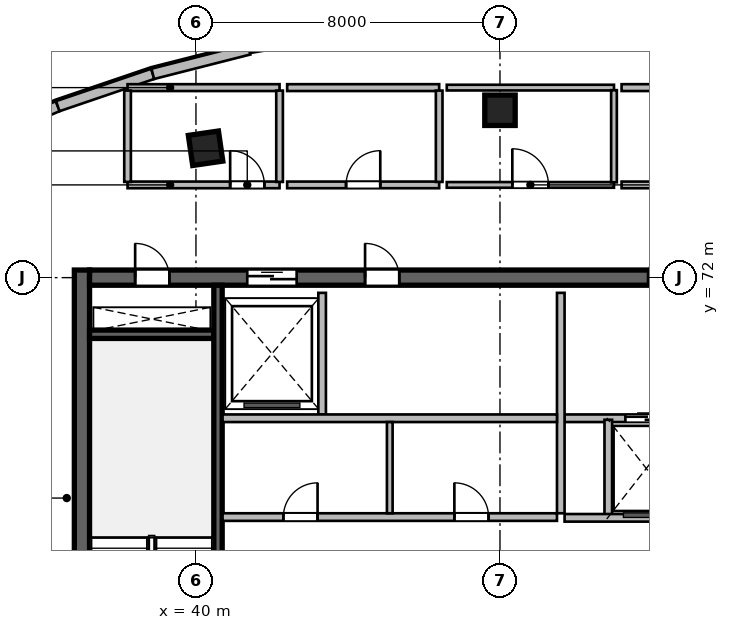
"""IFC4 building model, lengths in metres.
Left out: names, types, materials, properties, quantities, classifications, styles, units other than length and angle.
Written with IfcOpenShell. Run it as: python <this file> out.ifc"""

import sys

from ifc_helpers import new_model, si_unit, direction, frame, frame_2d, origin, origin_2d, place, context, subcontext, project, spatial, rectangle, extrude, source, transform, mapped, element, fill, save


model = new_model("IFC4")
c1 = context("Model", 3, precision=1e-05, world=origin(), true_north=direction((0.0, 1.0)))
c2 = subcontext(c1, "Body", "Model", "MODEL_VIEW")
j1 = project(units=[si_unit("LENGTHUNIT", "METRE"), si_unit("PLANEANGLEUNIT", "RADIAN")], contexts=[c1])
p1 = place(None, origin())
s1 = spatial("IfcSite", under=j1, at=p1, CompositionType="ELEMENT")
p2 = place(p1, origin())
s2 = spatial("IfcBuilding", under=s1, at=p2, CompositionType="ELEMENT")
p3 = place(p2, frame((0.0, 0.0, 283.5)))
s3 = spatial("IfcBuildingStorey", under=s2, at=p3, CompositionType="ELEMENT", Elevation=283.5)
m1 = source(origin(), c2, "Body", "SweptSolid", [
    extrude(rectangle(XDim=12.0, YDim=0.4, at=frame_2d((6.0, 0.0))), origin(), (0.0, 0.0, 1.0), 3.9),
])
p4 = place(p3, frame((37.0, 60.2, 0.0), z_axis=(0.0, 0.0, 1.0), x_axis=(0.0, 1.0, 0.0)))
e1 = element("IfcWall", 1, at=p4, inside=s3, PredefinedType="SHEAR", context=c2, shape_type="MappedRepresentation", body=[
    mapped(m1, transform((0.0, 0.0, 0.0), scale=1.0)),
])
m2 = source(origin(), c2, "Body", "SweptSolid", [
    extrude(rectangle(XDim=21.6, YDim=0.4, at=frame_2d((10.8, 0.0))), origin(), (0.0, 0.0, 1.0), 3.9),
])
p5 = place(p3, frame((37.2, 72.0, 0.0), z_axis=(0.0, 0.0, 1.0), x_axis=(1.0, 0.0, 0.0)))
e2 = element("IfcWall", 2, at=p5, inside=s3, PredefinedType="SHEAR", context=c2, shape_type="MappedRepresentation", body=[
    mapped(m2, transform((0.0, 0.0, 0.0), scale=1.0)),
])
p6 = place(p5, frame((1.2, 0.0, 0.0)))
e3 = element("IfcOpeningElement", 3, at=p6, cuts=e2, PredefinedType="OPENING", context=c2, shape_type="SweptSolid", body=[
    extrude(rectangle(XDim=0.9, YDim=2.1, at=frame_2d((0.45, 1.05))), frame((0.0, 0.21, 0.0), z_axis=(0.0, -1.0, 0.0), x_axis=(1.0, 0.0, 0.0)), (0.0, 0.0, 1.0), 0.42),
])
p7 = place(p5, frame((14.7, 0.0, 0.0)))
e4 = element("IfcOpeningElement", 4, at=p7, cuts=e2, PredefinedType="OPENING", context=c2, shape_type="SweptSolid", body=[
    extrude(rectangle(XDim=1.2, YDim=2.15, at=frame_2d((0.6, 1.075))), frame((0.0, 0.21, 0.0), z_axis=(0.0, -1.0, 0.0), x_axis=(1.0, 0.0, 0.0)), (0.0, 0.0, 1.0), 0.42),
])
p8 = place(p5, frame((4.15, 0.0, 0.0)))
e5 = element("IfcOpeningElement", 5, at=p8, cuts=e2, PredefinedType="OPENING", context=c2, shape_type="SweptSolid", body=[
    extrude(rectangle(XDim=1.3, YDim=2.15, at=frame_2d((0.65, 1.075))), frame((0.0, 0.21, 0.0), z_axis=(0.0, -1.0, 0.0), x_axis=(1.0, 0.0, 0.0)), (0.0, 0.0, 1.0), 0.42),
])
p9 = place(p5, frame((7.25, 0.0, 0.0)))
e6 = element("IfcOpeningElement", 6, at=p9, cuts=e2, PredefinedType="OPENING", context=c2, shape_type="SweptSolid", body=[
    extrude(rectangle(XDim=0.9, YDim=2.1, at=frame_2d((0.45, 1.05))), frame((0.0, 0.21, 0.0), z_axis=(0.0, -1.0, 0.0), x_axis=(1.0, 0.0, 0.0)), (0.0, 0.0, 1.0), 0.42),
])
m3 = source(origin(), c2, "Body", "SweptSolid", [
    extrude(rectangle(XDim=3.27, YDim=0.22, at=frame_2d((1.635, 0.0))), origin(), (0.0, 0.0, 1.0), 3.9),
])
p10 = place(p3, frame((37.2, 70.51, 0.0), z_axis=(0.0, 0.0, 1.0), x_axis=(1.0, 0.0, 0.0)))
e7 = element("IfcWall", 7, at=p10, inside=s3, PredefinedType="SHEAR", context=c2, shape_type="MappedRepresentation", body=[
    mapped(m3, transform((0.0, 0.0, 0.0), scale=1.0)),
])
m4 = source(origin(), c2, "Body", "SweptSolid", [
    extrude(rectangle(XDim=11.2, YDim=0.22, at=frame_2d((5.6, 0.0))), origin(), (0.0, 0.0, 1.0), 3.9),
])
p11 = place(p3, frame((40.58, 60.6, 0.0), z_axis=(0.0, 0.0, 1.0), x_axis=(0.0, 1.0, 0.0)))
e8 = element("IfcWall", 8, at=p11, inside=s3, PredefinedType="SHEAR", context=c2, shape_type="MappedRepresentation", body=[
    mapped(m4, transform((0.0, 0.0, 0.0), scale=1.0)),
])
m5 = source(origin(), c2, "Body", "SweptSolid", [
    extrude(rectangle(XDim=0.8, YDim=0.8, at=origin_2d()), origin(), (0.0, 0.0, 1.0), 3.9),
])
for number, where, z_axis, x_axis in (
    (9, (40.253, 75.404, 0.0), (0.0, 0.0, 1.0), (-0.143, 0.99, 0.0)),
    (10, (48.0, 76.404, 0.0), (0.0, 0.0, 1.0), (0.0, 1.0, 0.0)),
):
    element("IfcColumn", number, at=place(p3, frame(where, z_axis=z_axis, x_axis=x_axis)), inside=s3, PredefinedType="COLUMN", context=c2, shape_type="MappedRepresentation", body=[
        mapped(m5, transform((0.0, 0.0, 0.0), scale=1.0)),
    ])
m6 = source(origin(), c2, "Body", "SweptSolid", [
    extrude(rectangle(XDim=2.673, YDim=0.28, at=frame_2d((1.337, 0.0))), origin(), (0.0, 0.0, 1.0), 3.64),
])
p12 = place(p3, frame((33.907, 75.458, 0.0), z_axis=(0.0, 0.0, 1.0), x_axis=(0.919036345912, 0.394172798266, 0.0)))
e11 = element("IfcWall", 11, at=p12, inside=s3, PredefinedType="SOLIDWALL", context=c2, shape_type="MappedRepresentation", body=[
    mapped(m6, transform((0.0, 0.0, 0.0), scale=1.0)),
])
m7 = source(origin(), c2, "Body", "SweptSolid", [
    extrude(rectangle(XDim=2.64, YDim=0.28, at=frame_2d((1.32, 0.0))), origin(), (0.0, 0.0, 1.0), 3.64),
])
p13 = place(p3, frame((36.364, 76.511, 0.0), z_axis=(0.0, 0.0, 1.0), x_axis=(0.946685911962, 0.322158011064, 0.0)))
e12 = element("IfcWall", 12, at=p13, inside=s3, PredefinedType="SOLIDWALL", context=c2, shape_type="MappedRepresentation", body=[
    mapped(m7, transform((0.0, 0.0, 0.0), scale=1.0)),
])
m8 = source(origin(), c2, "Body", "SweptSolid", [
    extrude(rectangle(XDim=2.614, YDim=0.28, at=frame_2d((1.307, 0.0))), origin(), (0.0, 0.0, 1.0), 3.64),
])
p14 = place(p3, frame((38.863, 77.362, 0.0), z_axis=(0.0, 0.0, 1.0), x_axis=(0.969106509315, 0.246642602978, 0.0)))
e13 = element("IfcWall", 13, at=p14, inside=s3, PredefinedType="SOLIDWALL", context=c2, shape_type="MappedRepresentation", body=[
    mapped(m8, transform((0.0, 0.0, 0.0), scale=1.0)),
])
m9 = source(origin(), c2, "Body", "SweptSolid", [
    extrude(rectangle(XDim=5.62, YDim=0.2, at=frame_2d((2.81, 0.0))), origin(), (0.0, 0.0, 1.0), 3.64),
])
p15 = place(p3, frame((49.7, 68.3, 0.0), z_axis=(0.0, 0.0, 1.0), x_axis=(1.0, 0.0, 0.0)))
e14 = element("IfcWall", 14, at=p15, inside=s3, PredefinedType="SOLIDWALL", context=c2, shape_type="MappedRepresentation", body=[
    mapped(m9, transform((0.0, 0.0, 0.0), scale=1.0)),
])
p16 = place(p15, frame((1.6, 0.0, 0.0)))
e15 = element("IfcOpeningElement", 15, at=p16, cuts=e14, PredefinedType="OPENING", context=c2, shape_type="SweptSolid", body=[
    extrude(rectangle(XDim=1.1, YDim=2.15, at=frame_2d((0.55, 1.075))), frame((0.0, 0.11, 0.0), z_axis=(0.0, -1.0, 0.0), x_axis=(1.0, 0.0, 0.0)), (0.0, 0.0, 1.0), 0.22),
])
p17 = place(p15, frame((3.7, 0.0, 0.0)))
e16 = element("IfcOpeningElement", 16, at=p17, cuts=e14, PredefinedType="OPENING", context=c2, shape_type="SweptSolid", body=[
    extrude(rectangle(XDim=1.1, YDim=2.15, at=frame_2d((0.55, 1.075))), frame((0.0, 0.11, 0.0), z_axis=(0.0, -1.0, 0.0), x_axis=(1.0, 0.0, 0.0)), (0.0, 0.0, 1.0), 0.22),
])
m10 = source(origin(), c2, "Body", "SweptSolid", [
    extrude(rectangle(XDim=5.8, YDim=0.2, at=frame_2d((2.9, 0.0))), origin(), (0.0, 0.0, 1.0), 3.64),
])
p18 = place(p3, frame((49.6, 65.8, 0.0), z_axis=(0.0, 0.0, 1.0), x_axis=(0.0, 1.0, 0.0)))
e17 = element("IfcWall", 17, at=p18, inside=s3, PredefinedType="SOLIDWALL", context=c2, shape_type="MappedRepresentation", body=[
    mapped(m10, transform((0.0, 0.0, 0.0), scale=1.0)),
])
m11 = source(origin(), c2, "Body", "SweptSolid", [
    extrude(rectangle(XDim=2.58, YDim=0.2, at=frame_2d((1.29, 0.0))), origin(), (0.0, 0.0, 1.0), 3.64),
])
p19 = place(p3, frame((50.85, 65.68, 0.0), z_axis=(0.0, 0.0, 1.0), x_axis=(0.0, 1.0, 0.0)))
e18 = element("IfcWall", 18, at=p19, inside=s3, PredefinedType="SOLIDWALL", context=c2, shape_type="MappedRepresentation", body=[
    mapped(m11, transform((0.0, 0.0, 0.0), scale=1.0)),
])
p20 = place(p3, frame((49.7, 65.68, 0.0), z_axis=(0.0, 0.0, 1.0), x_axis=(1.0, 0.0, 0.0)))
e19 = element("IfcWall", 19, at=p20, inside=s3, PredefinedType="SOLIDWALL", context=c2, shape_type="MappedRepresentation", body=[
    mapped(m9, transform((0.0, 0.0, 0.0), scale=1.0)),
])
m12 = source(origin(), c2, "Body", "SweptSolid", [
    extrude(rectangle(XDim=3.2, YDim=0.2, at=frame_2d((1.6, 0.0))), origin(), (0.0, 0.0, 1.0), 3.64),
])
p21 = place(p3, frame((43.32, 68.4, 0.0), z_axis=(0.0, 0.0, 1.0), x_axis=(0.0, 1.0, 0.0)))
e20 = element("IfcWall", 20, at=p21, inside=s3, PredefinedType="SOLIDWALL", context=c2, shape_type="MappedRepresentation", body=[
    mapped(m12, transform((0.0, 0.0, 0.0), scale=1.0)),
])
m13 = source(origin(), c2, "Body", "SweptSolid", [
    extrude(rectangle(XDim=8.8, YDim=0.2, at=frame_2d((4.4, 0.0))), origin(), (0.0, 0.0, 1.0), 3.64),
])
p22 = place(p3, frame((40.7, 68.3, 0.0), z_axis=(0.0, 0.0, 1.0), x_axis=(1.0, 0.0, 0.0)))
e21 = element("IfcWall", 21, at=p22, inside=s3, PredefinedType="SOLIDWALL", context=c2, shape_type="MappedRepresentation", body=[
    mapped(m13, transform((0.0, 0.0, 0.0), scale=1.0)),
])
p23 = place(p3, frame((40.7, 65.7, 0.0), z_axis=(0.0, 0.0, 1.0), x_axis=(1.0, 0.0, 0.0)))
e22 = element("IfcWall", 22, at=p23, inside=s3, PredefinedType="SOLIDWALL", context=c2, shape_type="MappedRepresentation", body=[
    mapped(m13, transform((0.0, 0.0, 0.0), scale=1.0)),
])
p24 = place(p23, frame((1.6, 0.0, 0.0)))
e23 = element("IfcOpeningElement", 23, at=p24, cuts=e22, PredefinedType="OPENING", context=c2, shape_type="SweptSolid", body=[
    extrude(rectangle(XDim=0.9, YDim=2.1, at=frame_2d((0.45, 1.05))), frame((0.0, 0.11, 0.0), z_axis=(0.0, -1.0, 0.0), x_axis=(1.0, 0.0, 0.0)), (0.0, 0.0, 1.0), 0.22),
])
p25 = place(p23, frame((6.1, 0.0, 0.0)))
e24 = element("IfcOpeningElement", 24, at=p25, cuts=e22, PredefinedType="OPENING", context=c2, shape_type="SweptSolid", body=[
    extrude(rectangle(XDim=0.9, YDim=2.1, at=frame_2d((0.45, 1.05))), frame((0.0, 0.11, 0.0), z_axis=(0.0, -1.0, 0.0), x_axis=(1.0, 0.0, 0.0)), (0.0, 0.0, 1.0), 0.22),
])
m14 = source(origin(), c2, "Body", "SweptSolid", [
    extrude(rectangle(XDim=2.4, YDim=0.15, at=frame_2d((1.2, 0.0))), origin(), (0.0, 0.0, 1.0), 3.64),
])
p26 = place(p3, frame((45.1, 65.8, 0.0), z_axis=(0.0, 0.0, 1.0), x_axis=(0.0, 1.0, 0.0)))
e25 = element("IfcWall", 25, at=p26, inside=s3, PredefinedType="PARTITIONING", context=c2, shape_type="MappedRepresentation", body=[
    mapped(m14, transform((0.0, 0.0, 0.0), scale=1.0)),
])
m15 = source(origin(), c2, "Body", "SweptSolid", [
    extrude(rectangle(XDim=4.0, YDim=0.175, at=frame_2d((2.0, 0.0))), origin(), (0.0, 0.0, 1.0), 3.64),
])
p27 = place(p3, frame((38.2, 74.44, 0.0), z_axis=(0.0, 0.0, 1.0), x_axis=(1.0, 0.0, 0.0)))
e26 = element("IfcWall", 26, at=p27, inside=s3, PredefinedType="PARTITIONING", context=c2, shape_type="MappedRepresentation", body=[
    mapped(m15, transform((0.0, 0.0, 0.0), scale=1.0)),
])
p28 = place(p27, frame((2.7, 0.0, 0.0)))
e27 = element("IfcOpeningElement", 27, at=p28, cuts=e26, PredefinedType="OPENING", context=c2, shape_type="SweptSolid", body=[
    extrude(rectangle(XDim=0.9, YDim=2.08, at=frame_2d((0.45, 1.04))), frame((0.0, 0.098, 0.0), z_axis=(0.0, -1.0, 0.0), x_axis=(1.0, 0.0, 0.0)), (0.0, 0.0, 1.0), 0.195),
])
m16 = source(origin(), c2, "Body", "SweptSolid", [
    extrude(rectangle(XDim=4.0, YDim=0.18, at=frame_2d((2.0, 0.0))), origin(), (0.0, 0.0, 1.0), 3.64),
])
p29 = place(p3, frame((38.2, 77.0, 0.0), z_axis=(0.0, 0.0, 1.0), x_axis=(1.0, 0.0, 0.0)))
e28 = element("IfcWall", 28, at=p29, inside=s3, PredefinedType="PLUMBINGWALL", context=c2, shape_type="MappedRepresentation", body=[
    mapped(m16, transform((0.0, 0.0, 0.0), scale=1.0)),
])
m17 = source(origin(), c2, "Body", "SweptSolid", [
    extrude(rectangle(XDim=2.403, YDim=0.175, at=frame_2d((1.201, 0.0))), origin(), (0.0, 0.0, 1.0), 3.64),
])
for number, where, z_axis, x_axis in (
    (29, (38.2, 74.519, 0.0), (0.0, 0.0, 1.0), (0.0, 1.0, 0.0)),
    (30, (42.2, 74.519, 0.0), (0.0, 0.0, 1.0), (0.0, 1.0, 0.0)),
):
    element("IfcWall", number, at=place(p3, frame(where, z_axis=z_axis, x_axis=x_axis)), inside=s3, PredefinedType="PARTITIONING", context=c2, shape_type="MappedRepresentation", body=[
        mapped(m17, transform((0.0, 0.0, 0.0), scale=1.0)),
    ])
p30 = place(p3, frame((42.4, 74.44, 0.0), z_axis=(0.0, 0.0, 1.0), x_axis=(1.0, 0.0, 0.0)))
e31 = element("IfcWall", 31, at=p30, inside=s3, PredefinedType="PARTITIONING", context=c2, shape_type="MappedRepresentation", body=[
    mapped(m15, transform((0.0, 0.0, 0.0), scale=1.0)),
])
p31 = place(p30, frame((1.55, 0.0, 0.0)))
e32 = element("IfcOpeningElement", 32, at=p31, cuts=e31, PredefinedType="OPENING", context=c2, shape_type="SweptSolid", body=[
    extrude(rectangle(XDim=0.9, YDim=2.08, at=frame_2d((0.45, 1.04))), frame((0.0, 0.098, 0.0), z_axis=(0.0, -1.0, 0.0), x_axis=(1.0, 0.0, 0.0)), (0.0, 0.0, 1.0), 0.195),
])
p32 = place(p3, frame((42.4, 77.0, 0.0), z_axis=(0.0, 0.0, 1.0), x_axis=(1.0, 0.0, 0.0)))
e33 = element("IfcWall", 33, at=p32, inside=s3, PredefinedType="PLUMBINGWALL", context=c2, shape_type="MappedRepresentation", body=[
    mapped(m16, transform((0.0, 0.0, 0.0), scale=1.0)),
])
p33 = place(p3, frame((46.4, 74.519, 0.0), z_axis=(0.0, 0.0, 1.0), x_axis=(0.0, 1.0, 0.0)))
e34 = element("IfcWall", 34, at=p33, inside=s3, PredefinedType="PARTITIONING", context=c2, shape_type="MappedRepresentation", body=[
    mapped(m17, transform((0.0, 0.0, 0.0), scale=1.0)),
])
m18 = source(origin(), c2, "Body", "SweptSolid", [
    extrude(rectangle(XDim=4.4, YDim=0.15, at=frame_2d((2.2, 0.0))), origin(), (0.0, 0.0, 1.0), 3.64),
])
p34 = place(p3, frame((46.6, 74.44, 0.0), z_axis=(0.0, 0.0, 1.0), x_axis=(1.0, 0.0, 0.0)))
e35 = element("IfcWall", 35, at=p34, inside=s3, PredefinedType="PARTITIONING", context=c2, shape_type="MappedRepresentation", body=[
    mapped(m18, transform((0.0, 0.0, 0.0), scale=1.0)),
])
p35 = place(p34, frame((1.725, 0.0, 0.0)))
e36 = element("IfcOpeningElement", 36, at=p35, cuts=e35, PredefinedType="OPENING", context=c2, shape_type="SweptSolid", body=[
    extrude(rectangle(XDim=0.95, YDim=2.1, at=frame_2d((0.475, 1.05))), frame((0.0, 0.085, 0.0), z_axis=(0.0, -1.0, 0.0), x_axis=(1.0, 0.0, 0.0)), (0.0, 0.0, 1.0), 0.17),
])
p36 = place(p3, frame((46.6, 77.0, 0.0), z_axis=(0.0, 0.0, 1.0), x_axis=(1.0, 0.0, 0.0)))
e37 = element("IfcWall", 37, at=p36, inside=s3, PredefinedType="PARTITIONING", context=c2, shape_type="MappedRepresentation", body=[
    mapped(m18, transform((0.0, 0.0, 0.0), scale=1.0)),
])
m19 = source(origin(), c2, "Body", "SweptSolid", [
    extrude(rectangle(XDim=2.425, YDim=0.15, at=frame_2d((1.212, 0.0))), origin(), (0.0, 0.0, 1.0), 3.64),
])
p37 = place(p3, frame((51.0, 74.508, 0.0), z_axis=(0.0, 0.0, 1.0), x_axis=(0.0, 1.0, 0.0)))
e38 = element("IfcWall", 38, at=p37, inside=s3, PredefinedType="PARTITIONING", context=c2, shape_type="MappedRepresentation", body=[
    mapped(m19, transform((0.0, 0.0, 0.0), scale=1.0)),
])
m20 = source(origin(), c2, "Body", "SweptSolid", [
    extrude(rectangle(XDim=4.2, YDim=0.175, at=frame_2d((2.1, 0.0))), origin(), (0.0, 0.0, 1.0), 3.64),
])
p38 = place(p3, frame((51.2, 74.44, 0.0), z_axis=(0.0, 0.0, 1.0), x_axis=(1.0, 0.0, 0.0)))
e39 = element("IfcWall", 39, at=p38, inside=s3, PredefinedType="PARTITIONING", context=c2, shape_type="MappedRepresentation", body=[
    mapped(m20, transform((0.0, 0.0, 0.0), scale=1.0)),
])
p39 = place(p38, frame((1.625, 0.0, 0.0)))
e40 = element("IfcOpeningElement", 40, at=p39, cuts=e39, PredefinedType="OPENING", context=c2, shape_type="SweptSolid", body=[
    extrude(rectangle(XDim=0.95, YDim=2.12, at=frame_2d((0.475, 1.06))), frame((0.0, 0.098, 0.0), z_axis=(0.0, -1.0, 0.0), x_axis=(1.0, 0.0, 0.0)), (0.0, 0.0, 1.0), 0.195),
])
m21 = source(origin(), c2, "Body", "SweptSolid", [
    extrude(rectangle(XDim=4.2, YDim=0.18, at=frame_2d((2.1, 0.0))), origin(), (0.0, 0.0, 1.0), 3.64),
])
p40 = place(p3, frame((51.2, 77.0, 0.0), z_axis=(0.0, 0.0, 1.0), x_axis=(1.0, 0.0, 0.0)))
e41 = element("IfcWall", 41, at=p40, inside=s3, PredefinedType="PLUMBINGWALL", context=c2, shape_type="MappedRepresentation", body=[
    mapped(m21, transform((0.0, 0.0, 0.0), scale=1.0)),
])
m22 = source(origin(), c2, "Body", "SweptSolid", [
    extrude(rectangle(XDim=12.311, YDim=0.195, at=frame_2d((6.155, 0.0))), origin(), (0.0, 0.0, 1.0), 3.64),
])
p41 = place(p3, frame((36.5, 63.216, 0.0), z_axis=(0.0, 0.0, 1.0), x_axis=(-0.268759602651, 0.963207286093, 0.0)))
e42 = element("IfcWall", 42, at=p41, inside=s3, PredefinedType="PARTITIONING", context=c2, shape_type="MappedRepresentation", body=[
    mapped(m22, transform((0.0, 0.0, 0.0), scale=1.0)),
])
m23 = source(origin(), c2, "Body", "SweptSolid", [
    extrude(rectangle(XDim=0.9, YDim=2.1, at=frame_2d((0.45, 1.05))), frame((0.0, 0.025, 0.0), z_axis=(0.0, -1.0, 0.0), x_axis=(1.0, 0.0, 0.0)), (0.0, 0.0, 1.0), 0.05),
])
p42 = place(p6, origin())
e43 = element("IfcDoor", 43, at=p42, inside=s3, OperationType="SINGLE_SWING_LEFT", PredefinedType="DOOR", context=c2, shape_type="MappedRepresentation", body=[
    mapped(m23, transform((0.0, 0.0, 0.0), scale=1.0)),
])
fill(e3, e43)
m24 = source(origin(), c2, "Body", "SweptSolid", [
    extrude(rectangle(XDim=1.2, YDim=2.15, at=frame_2d((0.6, 1.075))), frame((0.0, 0.025, 0.0), z_axis=(0.0, -1.0, 0.0), x_axis=(1.0, 0.0, 0.0)), (0.0, 0.0, 1.0), 0.05),
])
p43 = place(p7, origin())
e44 = element("IfcDoor", 44, at=p43, inside=s3, OperationType="SINGLE_SWING_RIGHT", PredefinedType="DOOR", context=c2, shape_type="MappedRepresentation", body=[
    mapped(m24, transform((0.0, 0.0, 0.0), scale=1.0)),
])
fill(e4, e44)
m25 = source(origin(), c2, "Body", "SweptSolid", [
    extrude(rectangle(XDim=1.1, YDim=2.15, at=frame_2d((0.55, 1.075))), frame((0.0, 0.025, 0.0), z_axis=(0.0, -1.0, 0.0), x_axis=(1.0, 0.0, 0.0)), (0.0, 0.0, 1.0), 0.05),
])
p44 = place(p16, origin())
e45 = element("IfcDoor", 45, at=p44, inside=s3, OperationType="DOUBLE_DOOR_SLIDING", PredefinedType="DOOR", context=c2, shape_type="MappedRepresentation", body=[
    mapped(m25, transform((0.0, 0.0, 0.0), scale=1.0)),
])
fill(e15, e45)
m26 = source(origin(), c2, "Body", "SweptSolid", [
    extrude(rectangle(XDim=1.3, YDim=2.15, at=frame_2d((0.65, 1.075))), frame((0.0, 0.025, 0.0), z_axis=(0.0, -1.0, 0.0), x_axis=(1.0, 0.0, 0.0)), (0.0, 0.0, 1.0), 0.05),
])
p45 = place(p8, origin())
e46 = element("IfcDoor", 46, at=p45, inside=s3, OperationType="DOUBLE_DOOR_SLIDING", PredefinedType="DOOR", context=c2, shape_type="MappedRepresentation", body=[
    mapped(m26, transform((0.0, 0.0, 0.0), scale=1.0)),
])
fill(e5, e46)
p46 = place(p9, origin())
e47 = element("IfcDoor", 47, at=p46, inside=s3, OperationType="SINGLE_SWING_LEFT", PredefinedType="DOOR", context=c2, shape_type="MappedRepresentation", body=[
    mapped(m23, transform((0.0, 0.0, 0.0), scale=1.0)),
])
fill(e6, e47)
p47 = place(p24, origin())
e48 = element("IfcDoor", 48, at=p47, inside=s3, OperationType="SINGLE_SWING_RIGHT", PredefinedType="DOOR", context=c2, shape_type="MappedRepresentation", body=[
    mapped(m23, transform((0.0, 0.0, 0.0), scale=1.0)),
])
fill(e23, e48)
p48 = place(p25, origin())
e49 = element("IfcDoor", 49, at=p48, inside=s3, OperationType="SINGLE_SWING_LEFT", PredefinedType="DOOR", context=c2, shape_type="MappedRepresentation", body=[
    mapped(m23, transform((0.0, 0.0, 0.0), scale=1.0)),
])
fill(e24, e49)
m27 = source(origin(), c2, "Body", "SweptSolid", [
    extrude(rectangle(XDim=0.9, YDim=2.08, at=frame_2d((0.45, 1.04))), frame((0.0, 0.025, 0.0), z_axis=(0.0, -1.0, 0.0), x_axis=(1.0, 0.0, 0.0)), (0.0, 0.0, 1.0), 0.05),
])
p49 = place(p28, origin())
e50 = element("IfcDoor", 50, at=p49, inside=s3, OperationType="SINGLE_SWING_LEFT", PredefinedType="DOOR", context=c2, shape_type="MappedRepresentation", body=[
    mapped(m27, transform((0.0, 0.0, 0.0), scale=1.0)),
])
fill(e27, e50)
p50 = place(p31, origin())
e51 = element("IfcDoor", 51, at=p50, inside=s3, OperationType="SINGLE_SWING_RIGHT", PredefinedType="DOOR", context=c2, shape_type="MappedRepresentation", body=[
    mapped(m27, transform((0.0, 0.0, 0.0), scale=1.0)),
])
fill(e32, e51)
m28 = source(origin(), c2, "Body", "SweptSolid", [
    extrude(rectangle(XDim=0.95, YDim=2.1, at=frame_2d((0.475, 1.05))), frame((0.0, 0.025, 0.0), z_axis=(0.0, -1.0, 0.0), x_axis=(1.0, 0.0, 0.0)), (0.0, 0.0, 1.0), 0.05),
])
p51 = place(p35, origin())
e52 = element("IfcDoor", 52, at=p51, inside=s3, OperationType="SINGLE_SWING_LEFT", PredefinedType="DOOR", context=c2, shape_type="MappedRepresentation", body=[
    mapped(m28, transform((0.0, 0.0, 0.0), scale=1.0)),
])
fill(e36, e52)
save(model, sys.argv[1])
